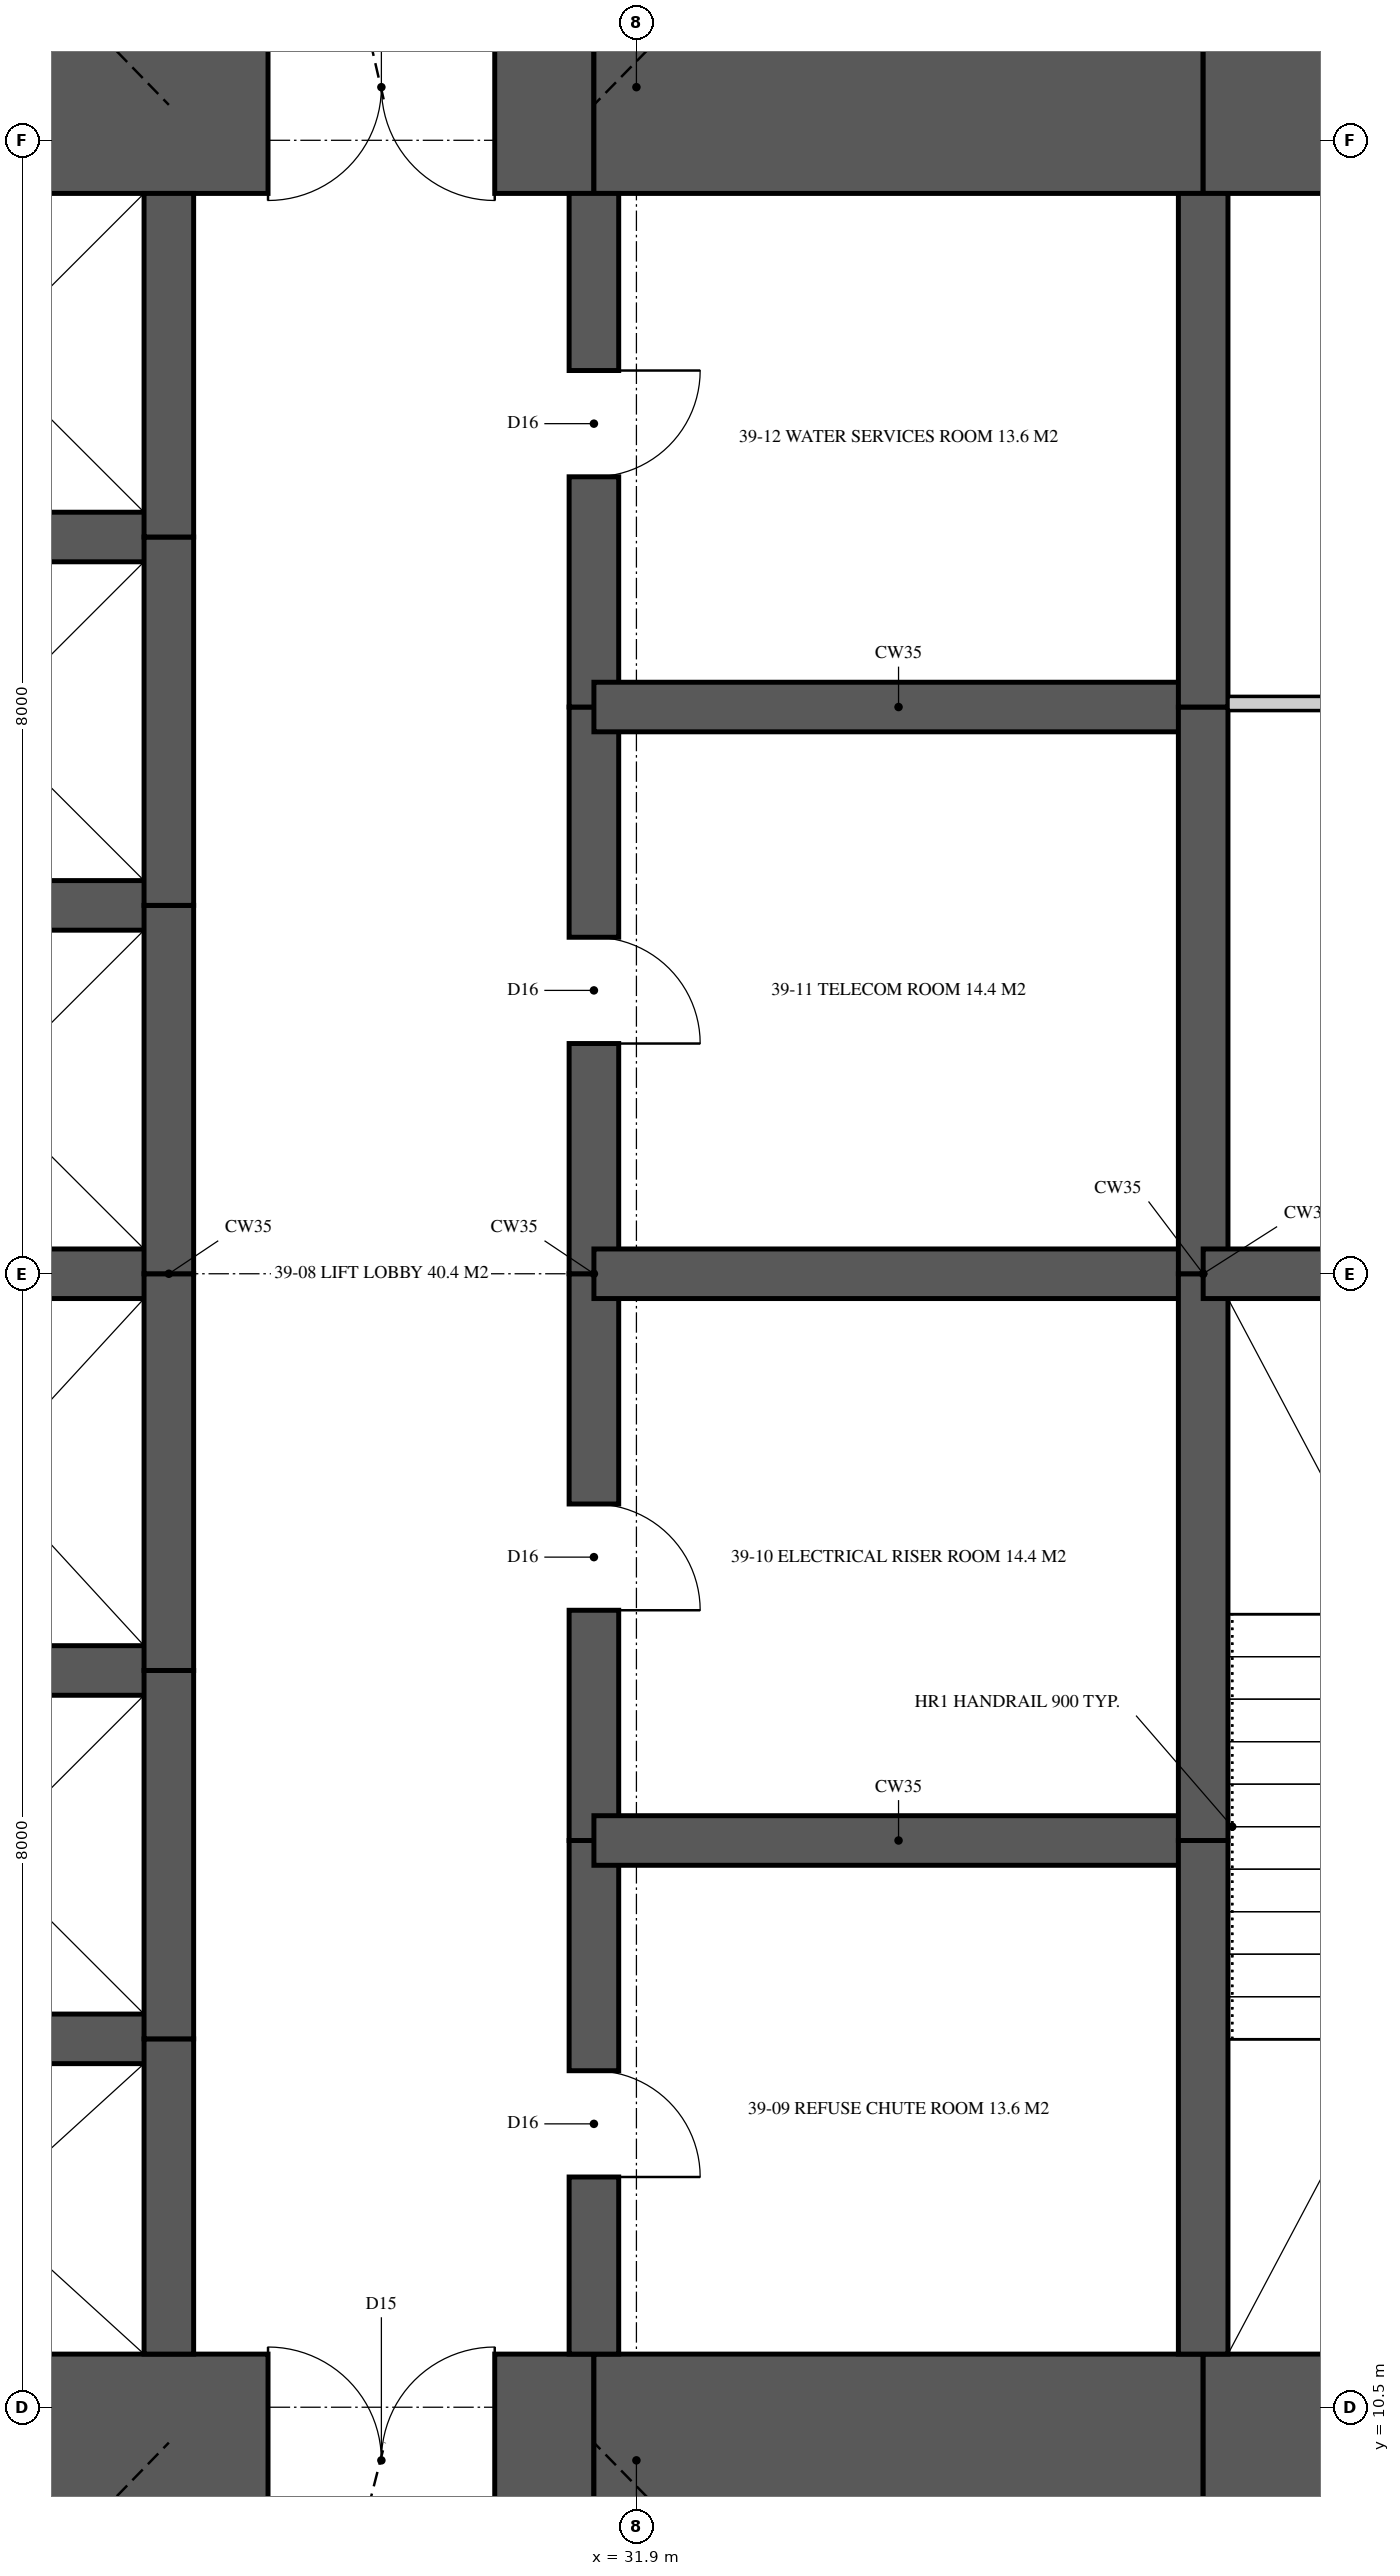
"""IFC4 building model, lengths in metres.
Left out: names, types, materials, properties, quantities, classifications, styles, units other than length and angle.
Written with IfcOpenShell. Run it as: python <this file> out.ifc"""

import sys

from ifc_helpers import new_model, si_unit, direction, frame, frame_2d, origin, place, context, subcontext, project, spatial, rectangle, extrude, element, fill, save


model = new_model("IFC4")
c1 = context("Model", 3, precision=1e-05, world=origin(), true_north=direction((0.0, 1.0)))
c2 = subcontext(c1, "Body", "Model", "MODEL_VIEW")
j1 = project(units=[si_unit("LENGTHUNIT", "METRE"), si_unit("PLANEANGLEUNIT", "RADIAN")], contexts=[c1])
p1 = place(None, origin())
s1 = spatial("IfcSite", under=j1, at=p1, CompositionType="ELEMENT")
p2 = place(p1, origin())
s2 = spatial("IfcBuilding", under=s1, at=p2, CompositionType="ELEMENT")
p3 = place(p2, frame((0.0, 0.0, 144.35)))
s3 = spatial("IfcBuildingStorey", under=s2, at=p3, CompositionType="ELEMENT", Elevation=144.35)
p4 = place(p3, frame((26.0, 10.125, 0.0), z_axis=(0.0, 0.0, 1.0), x_axis=(1.0, 0.0, 0.0)))
e1 = element("IfcWall", 1, at=p4, inside=s3, PredefinedType="SHEAR", context=c2, shape_type="SweptSolid", body=[
    extrude(rectangle(XDim=5.6, YDim=1.5, at=frame_2d((2.8, 0.0))), origin(), (0.0, 0.0, 1.0), 5.0),
])
p5 = place(p4, frame((3.3, 0.0, 0.0)))
e2 = element("IfcOpeningElement", 2, at=p5, cuts=e1, PredefinedType="OPENING", context=c2, shape_type="SweptSolid", body=[
    extrude(rectangle(XDim=1.6, YDim=2.1, at=frame_2d((0.8, 1.05))), frame((0.0, 0.76, 0.0), z_axis=(0.0, -1.0, 0.0), x_axis=(1.0, 0.0, 0.0)), (0.0, 0.0, 1.0), 1.52),
])
p6 = place(p3, frame((31.6, 10.125, 0.0), z_axis=(0.0, 0.0, 1.0), x_axis=(1.0, 0.0, 0.0)))
e3 = element("IfcWall", 3, at=p6, inside=s3, PredefinedType="SHEAR", context=c2, shape_type="SweptSolid", body=[
    extrude(rectangle(XDim=4.3, YDim=1.5, at=frame_2d((2.15, 0.0))), origin(), (0.0, 0.0, 1.0), 5.0),
])
p7 = place(p3, frame((35.9, 10.125, 0.0), z_axis=(0.0, 0.0, 1.0), x_axis=(1.0, 0.0, 0.0)))
e4 = element("IfcWall", 4, at=p7, inside=s3, PredefinedType="SHEAR", context=c2, shape_type="SweptSolid", body=[
    extrude(rectangle(XDim=8.325, YDim=1.5, at=frame_2d((4.163, 0.0))), origin(), (0.0, 0.0, 1.0), 5.0),
])
p8 = place(p7, frame((2.7, 0.0, 0.0)))
e5 = element("IfcOpeningElement", 5, at=p8, cuts=e4, PredefinedType="OPENING", context=c2, shape_type="SweptSolid", body=[
    extrude(rectangle(XDim=1.0, YDim=2.1, at=frame_2d((0.5, 1.05))), frame((0.0, 0.76, 0.0), z_axis=(0.0, -1.0, 0.0), x_axis=(1.0, 0.0, 0.0)), (0.0, 0.0, 1.0), 1.52),
])
p9 = place(p3, frame((44.225, 26.875, 0.0), z_axis=(0.0, 0.0, 1.0), x_axis=(-1.0, 0.0, 0.0)))
e6 = element("IfcWall", 6, at=p9, inside=s3, PredefinedType="SHEAR", context=c2, shape_type="SweptSolid", body=[
    extrude(rectangle(XDim=8.325, YDim=1.5, at=frame_2d((4.163, 0.0))), origin(), (0.0, 0.0, 1.0), 5.0),
])
p10 = place(p9, frame((5.725, 0.0, 0.0)))
e7 = element("IfcOpeningElement", 7, at=p10, cuts=e6, PredefinedType="OPENING", context=c2, shape_type="SweptSolid", body=[
    extrude(rectangle(XDim=0.9, YDim=2.1, at=frame_2d((0.45, 1.05))), frame((0.0, 0.76, 0.0), z_axis=(0.0, -1.0, 0.0), x_axis=(1.0, 0.0, 0.0)), (0.0, 0.0, 1.0), 1.52),
])
p11 = place(p3, frame((35.9, 26.875, 0.0), z_axis=(0.0, 0.0, 1.0), x_axis=(-1.0, 0.0, 0.0)))
e8 = element("IfcWall", 8, at=p11, inside=s3, PredefinedType="SHEAR", context=c2, shape_type="SweptSolid", body=[
    extrude(rectangle(XDim=4.3, YDim=1.5, at=frame_2d((2.15, 0.0))), origin(), (0.0, 0.0, 1.0), 5.0),
])
p12 = place(p3, frame((31.6, 26.875, 0.0), z_axis=(0.0, 0.0, 1.0), x_axis=(-1.0, 0.0, 0.0)))
e9 = element("IfcWall", 9, at=p12, inside=s3, PredefinedType="SHEAR", context=c2, shape_type="SweptSolid", body=[
    extrude(rectangle(XDim=5.6, YDim=1.5, at=frame_2d((2.8, 0.0))), origin(), (0.0, 0.0, 1.0), 5.0),
])
p13 = place(p12, frame((0.7, 0.0, 0.0)))
e10 = element("IfcOpeningElement", 10, at=p13, cuts=e9, PredefinedType="OPENING", context=c2, shape_type="SweptSolid", body=[
    extrude(rectangle(XDim=1.6, YDim=2.1, at=frame_2d((0.8, 1.05))), frame((0.0, 0.76, 0.0), z_axis=(0.0, -1.0, 0.0), x_axis=(1.0, 0.0, 0.0)), (0.0, 0.0, 1.0), 1.52),
])
p14 = place(p3, frame((28.6, 10.875, 0.0), z_axis=(0.0, 0.0, 1.0), x_axis=(0.0, 1.0, 0.0)))
e11 = element("IfcWall", 11, at=p14, inside=s3, PredefinedType="SHEAR", context=c2, shape_type="SweptSolid", body=[
    extrude(rectangle(XDim=2.225, YDim=0.35, at=frame_2d((1.113, 0.0))), origin(), (0.0, 0.0, 1.0), 5.0),
])
p15 = place(p3, frame((28.6, 13.1, 0.0), z_axis=(0.0, 0.0, 1.0), x_axis=(0.0, 1.0, 0.0)))
e12 = element("IfcWall", 12, at=p15, inside=s3, PredefinedType="SHEAR", context=c2, shape_type="SweptSolid", body=[
    extrude(rectangle(XDim=2.6, YDim=0.35, at=frame_2d((1.3, 0.0))), origin(), (0.0, 0.0, 1.0), 5.0),
])
p16 = place(p3, frame((28.6, 15.7, 0.0), z_axis=(0.0, 0.0, 1.0), x_axis=(0.0, 1.0, 0.0)))
e13 = element("IfcWall", 13, at=p16, inside=s3, PredefinedType="SHEAR", context=c2, shape_type="SweptSolid", body=[
    extrude(rectangle(XDim=2.8, YDim=0.35, at=frame_2d((1.4, 0.0))), origin(), (0.0, 0.0, 1.0), 5.0),
])
p17 = place(p3, frame((28.6, 18.5, 0.0), z_axis=(0.0, 0.0, 1.0), x_axis=(0.0, 1.0, 0.0)))
e14 = element("IfcWall", 14, at=p17, inside=s3, PredefinedType="SHEAR", context=c2, shape_type="SweptSolid", body=[
    extrude(rectangle(XDim=2.6, YDim=0.35, at=frame_2d((1.3, 0.0))), origin(), (0.0, 0.0, 1.0), 5.0),
])
p18 = place(p3, frame((28.6, 21.1, 0.0), z_axis=(0.0, 0.0, 1.0), x_axis=(0.0, 1.0, 0.0)))
e15 = element("IfcWall", 15, at=p18, inside=s3, PredefinedType="SHEAR", context=c2, shape_type="SweptSolid", body=[
    extrude(rectangle(XDim=2.6, YDim=0.35, at=frame_2d((1.3, 0.0))), origin(), (0.0, 0.0, 1.0), 5.0),
])
p19 = place(p3, frame((28.6, 23.7, 0.0), z_axis=(0.0, 0.0, 1.0), x_axis=(0.0, 1.0, 0.0)))
e16 = element("IfcWall", 16, at=p19, inside=s3, PredefinedType="SHEAR", context=c2, shape_type="SweptSolid", body=[
    extrude(rectangle(XDim=2.425, YDim=0.35, at=frame_2d((1.212, 0.0))), origin(), (0.0, 0.0, 1.0), 5.0),
])
p20 = place(p3, frame((31.6, 10.875, 0.0), z_axis=(0.0, 0.0, 1.0), x_axis=(0.0, 1.0, 0.0)))
e17 = element("IfcWall", 17, at=p20, inside=s3, PredefinedType="SHEAR", context=c2, shape_type="SweptSolid", body=[
    extrude(rectangle(XDim=3.625, YDim=0.35, at=frame_2d((1.812, 0.0))), origin(), (0.0, 0.0, 1.0), 5.0),
])
p21 = place(p20, frame((1.25, 0.0, 0.0)))
e18 = element("IfcOpeningElement", 18, at=p21, cuts=e17, PredefinedType="OPENING", context=c2, shape_type="SweptSolid", body=[
    extrude(rectangle(XDim=0.75, YDim=2.1, at=frame_2d((0.375, 1.05))), frame((0.0, 0.185, 0.0), z_axis=(0.0, -1.0, 0.0), x_axis=(1.0, 0.0, 0.0)), (0.0, 0.0, 1.0), 0.37),
])
p22 = place(p3, frame((31.6, 14.5, 0.0), z_axis=(0.0, 0.0, 1.0), x_axis=(0.0, 1.0, 0.0)))
e19 = element("IfcWall", 19, at=p22, inside=s3, PredefinedType="SHEAR", context=c2, shape_type="SweptSolid", body=[
    extrude(rectangle(XDim=4.0, YDim=0.35, at=frame_2d((2.0, 0.0))), origin(), (0.0, 0.0, 1.0), 5.0),
])
p23 = place(p22, frame((1.625, 0.0, 0.0)))
e20 = element("IfcOpeningElement", 20, at=p23, cuts=e19, PredefinedType="OPENING", context=c2, shape_type="SweptSolid", body=[
    extrude(rectangle(XDim=0.75, YDim=2.1, at=frame_2d((0.375, 1.05))), frame((0.0, 0.185, 0.0), z_axis=(0.0, -1.0, 0.0), x_axis=(1.0, 0.0, 0.0)), (0.0, 0.0, 1.0), 0.37),
])
p24 = place(p3, frame((31.6, 18.5, 0.0), z_axis=(0.0, 0.0, 1.0), x_axis=(0.0, 1.0, 0.0)))
e21 = element("IfcWall", 21, at=p24, inside=s3, PredefinedType="SHEAR", context=c2, shape_type="SweptSolid", body=[
    extrude(rectangle(XDim=4.0, YDim=0.35, at=frame_2d((2.0, 0.0))), origin(), (0.0, 0.0, 1.0), 5.0),
])
p25 = place(p24, frame((1.625, 0.0, 0.0)))
e22 = element("IfcOpeningElement", 22, at=p25, cuts=e21, PredefinedType="OPENING", context=c2, shape_type="SweptSolid", body=[
    extrude(rectangle(XDim=0.75, YDim=2.1, at=frame_2d((0.375, 1.05))), frame((0.0, 0.185, 0.0), z_axis=(0.0, -1.0, 0.0), x_axis=(1.0, 0.0, 0.0)), (0.0, 0.0, 1.0), 0.37),
])
p26 = place(p3, frame((31.6, 22.5, 0.0), z_axis=(0.0, 0.0, 1.0), x_axis=(0.0, 1.0, 0.0)))
e23 = element("IfcWall", 23, at=p26, inside=s3, PredefinedType="SHEAR", context=c2, shape_type="SweptSolid", body=[
    extrude(rectangle(XDim=3.625, YDim=0.35, at=frame_2d((1.812, 0.0))), origin(), (0.0, 0.0, 1.0), 5.0),
])
p27 = place(p26, frame((1.625, 0.0, 0.0)))
e24 = element("IfcOpeningElement", 24, at=p27, cuts=e23, PredefinedType="OPENING", context=c2, shape_type="SweptSolid", body=[
    extrude(rectangle(XDim=0.75, YDim=2.1, at=frame_2d((0.375, 1.05))), frame((0.0, 0.185, 0.0), z_axis=(0.0, -1.0, 0.0), x_axis=(1.0, 0.0, 0.0)), (0.0, 0.0, 1.0), 0.37),
])
p28 = place(p3, frame((35.9, 10.875, 0.0), z_axis=(0.0, 0.0, 1.0), x_axis=(0.0, 1.0, 0.0)))
e25 = element("IfcWall", 25, at=p28, inside=s3, PredefinedType="SHEAR", context=c2, shape_type="SweptSolid", body=[
    extrude(rectangle(XDim=3.625, YDim=0.35, at=frame_2d((1.812, 0.0))), origin(), (0.0, 0.0, 1.0), 5.0),
])
for number, where, z_axis, x_axis in (
    (26, (35.9, 14.5, 0.0), (0.0, 0.0, 1.0), (0.0, 1.0, 0.0)),
    (27, (35.9, 18.5, 0.0), (0.0, 0.0, 1.0), (0.0, 1.0, 0.0)),
):
    element("IfcWall", number, at=place(p3, frame(where, z_axis=z_axis, x_axis=x_axis)), inside=s3, PredefinedType="SHEAR", context=c2, shape_type="SweptSolid", body=[
        extrude(rectangle(XDim=4.0, YDim=0.35, at=frame_2d((2.0, 0.0))), origin(), (0.0, 0.0, 1.0), 5.0),
    ])
p29 = place(p3, frame((35.9, 22.5, 0.0), z_axis=(0.0, 0.0, 1.0), x_axis=(0.0, 1.0, 0.0)))
e28 = element("IfcWall", 28, at=p29, inside=s3, PredefinedType="SHEAR", context=c2, shape_type="SweptSolid", body=[
    extrude(rectangle(XDim=3.625, YDim=0.35, at=frame_2d((1.812, 0.0))), origin(), (0.0, 0.0, 1.0), 5.0),
])
for number, where, z_axis, x_axis in (
    (29, (26.0, 13.1, 0.0), (0.0, 0.0, 1.0), (1.0, 0.0, 0.0)),
    (30, (26.0, 15.7, 0.0), (0.0, 0.0, 1.0), (1.0, 0.0, 0.0)),
    (31, (26.0, 18.5, 0.0), (0.0, 0.0, 1.0), (1.0, 0.0, 0.0)),
    (32, (26.0, 21.1, 0.0), (0.0, 0.0, 1.0), (1.0, 0.0, 0.0)),
    (33, (26.0, 23.7, 0.0), (0.0, 0.0, 1.0), (1.0, 0.0, 0.0)),
):
    element("IfcWall", number, at=place(p3, frame(where, z_axis=z_axis, x_axis=x_axis)), inside=s3, PredefinedType="SHEAR", context=c2, shape_type="SweptSolid", body=[
        extrude(rectangle(XDim=2.6, YDim=0.35, at=frame_2d((1.3, 0.0))), origin(), (0.0, 0.0, 1.0), 5.0),
    ])
for number, where, z_axis, x_axis in (
    (34, (31.6, 14.5, 0.0), (0.0, 0.0, 1.0), (1.0, 0.0, 0.0)),
    (35, (31.6, 18.5, 0.0), (0.0, 0.0, 1.0), (1.0, 0.0, 0.0)),
    (36, (31.6, 22.5, 0.0), (0.0, 0.0, 1.0), (1.0, 0.0, 0.0)),
):
    element("IfcWall", number, at=place(p3, frame(where, z_axis=z_axis, x_axis=x_axis)), inside=s3, PredefinedType="SHEAR", context=c2, shape_type="SweptSolid", body=[
        extrude(rectangle(XDim=4.3, YDim=0.35, at=frame_2d((2.15, 0.0))), origin(), (0.0, 0.0, 1.0), 5.0),
    ])
p30 = place(p3, frame((35.9, 18.5, 0.0), z_axis=(0.0, 0.0, 1.0), x_axis=(1.0, 0.0, 0.0)))
e37 = element("IfcWall", 37, at=p30, inside=s3, PredefinedType="SHEAR", context=c2, shape_type="SweptSolid", body=[
    extrude(rectangle(XDim=4.3, YDim=0.35, at=frame_2d((2.15, 0.0))), origin(), (0.0, 0.0, 1.0), 5.0),
])
p31 = place(p3, frame((36.075, 22.525, 0.0), z_axis=(0.0, 0.0, 1.0), x_axis=(1.0, 0.0, 0.0)))
e38 = element("IfcWall", 38, at=p31, inside=s3, PredefinedType="PARTITIONING", context=c2, shape_type="SweptSolid", body=[
    extrude(rectangle(XDim=3.95, YDim=0.1, at=frame_2d((1.975, 0.0))), origin(), (0.0, 0.0, 1.0), 4.72),
])
p32 = place(p31, frame((1.525, 0.0, 0.0)))
e39 = element("IfcOpeningElement", 39, at=p32, cuts=e38, PredefinedType="OPENING", context=c2, shape_type="SweptSolid", body=[
    extrude(rectangle(XDim=0.9, YDim=2.1, at=frame_2d((0.45, 1.05))), frame((0.0, 0.06, 0.0), z_axis=(0.0, -1.0, 0.0), x_axis=(1.0, 0.0, 0.0)), (0.0, 0.0, 1.0), 0.12),
])
p33 = place(p5, origin())
e40 = element("IfcDoor", 40, at=p33, inside=s3, OperationType="DOUBLE_DOOR_SINGLE_SWING", PredefinedType="DOOR", context=c2, shape_type="SweptSolid", body=[
    extrude(rectangle(XDim=1.6, YDim=2.1, at=frame_2d((0.8, 1.05))), frame((0.0, 0.025, 0.0), z_axis=(0.0, -1.0, 0.0), x_axis=(1.0, 0.0, 0.0)), (0.0, 0.0, 1.0), 0.05),
])
fill(e2, e40)
p34 = place(p13, origin())
e41 = element("IfcDoor", 41, at=p34, inside=s3, OperationType="DOUBLE_DOOR_SINGLE_SWING", PredefinedType="DOOR", context=c2, shape_type="SweptSolid", body=[
    extrude(rectangle(XDim=1.6, YDim=2.1, at=frame_2d((0.8, 1.05))), frame((0.0, 0.025, 0.0), z_axis=(0.0, -1.0, 0.0), x_axis=(1.0, 0.0, 0.0)), (0.0, 0.0, 1.0), 0.05),
])
fill(e10, e41)
p35 = place(p21, frame((0.75, 0.0, 0.0), z_axis=(0.0, 0.0, 1.0), x_axis=(-1.0, 0.0, 0.0)))
e42 = element("IfcDoor", 42, at=p35, inside=s3, OperationType="SINGLE_SWING_RIGHT", PredefinedType="DOOR", context=c2, shape_type="SweptSolid", body=[
    extrude(rectangle(XDim=0.75, YDim=2.1, at=frame_2d((0.375, 1.05))), frame((0.0, 0.025, 0.0), z_axis=(0.0, -1.0, 0.0), x_axis=(1.0, 0.0, 0.0)), (0.0, 0.0, 1.0), 0.05),
])
fill(e18, e42)
p36 = place(p23, frame((0.75, 0.0, 0.0), z_axis=(0.0, 0.0, 1.0), x_axis=(-1.0, 0.0, 0.0)))
e43 = element("IfcDoor", 43, at=p36, inside=s3, OperationType="SINGLE_SWING_RIGHT", PredefinedType="DOOR", context=c2, shape_type="SweptSolid", body=[
    extrude(rectangle(XDim=0.75, YDim=2.1, at=frame_2d((0.375, 1.05))), frame((0.0, 0.025, 0.0), z_axis=(0.0, -1.0, 0.0), x_axis=(1.0, 0.0, 0.0)), (0.0, 0.0, 1.0), 0.05),
])
fill(e20, e43)
p37 = place(p25, frame((0.75, 0.0, 0.0), z_axis=(0.0, 0.0, 1.0), x_axis=(-1.0, 0.0, 0.0)))
e44 = element("IfcDoor", 44, at=p37, inside=s3, OperationType="SINGLE_SWING_RIGHT", PredefinedType="DOOR", context=c2, shape_type="SweptSolid", body=[
    extrude(rectangle(XDim=0.75, YDim=2.1, at=frame_2d((0.375, 1.05))), frame((0.0, 0.025, 0.0), z_axis=(0.0, -1.0, 0.0), x_axis=(1.0, 0.0, 0.0)), (0.0, 0.0, 1.0), 0.05),
])
fill(e22, e44)
p38 = place(p27, frame((0.75, 0.0, 0.0), z_axis=(0.0, 0.0, 1.0), x_axis=(-1.0, 0.0, 0.0)))
e45 = element("IfcDoor", 45, at=p38, inside=s3, OperationType="SINGLE_SWING_LEFT", PredefinedType="DOOR", context=c2, shape_type="SweptSolid", body=[
    extrude(rectangle(XDim=0.75, YDim=2.1, at=frame_2d((0.375, 1.05))), frame((0.0, 0.025, 0.0), z_axis=(0.0, -1.0, 0.0), x_axis=(1.0, 0.0, 0.0)), (0.0, 0.0, 1.0), 0.05),
])
fill(e24, e45)
save(model, sys.argv[1])
